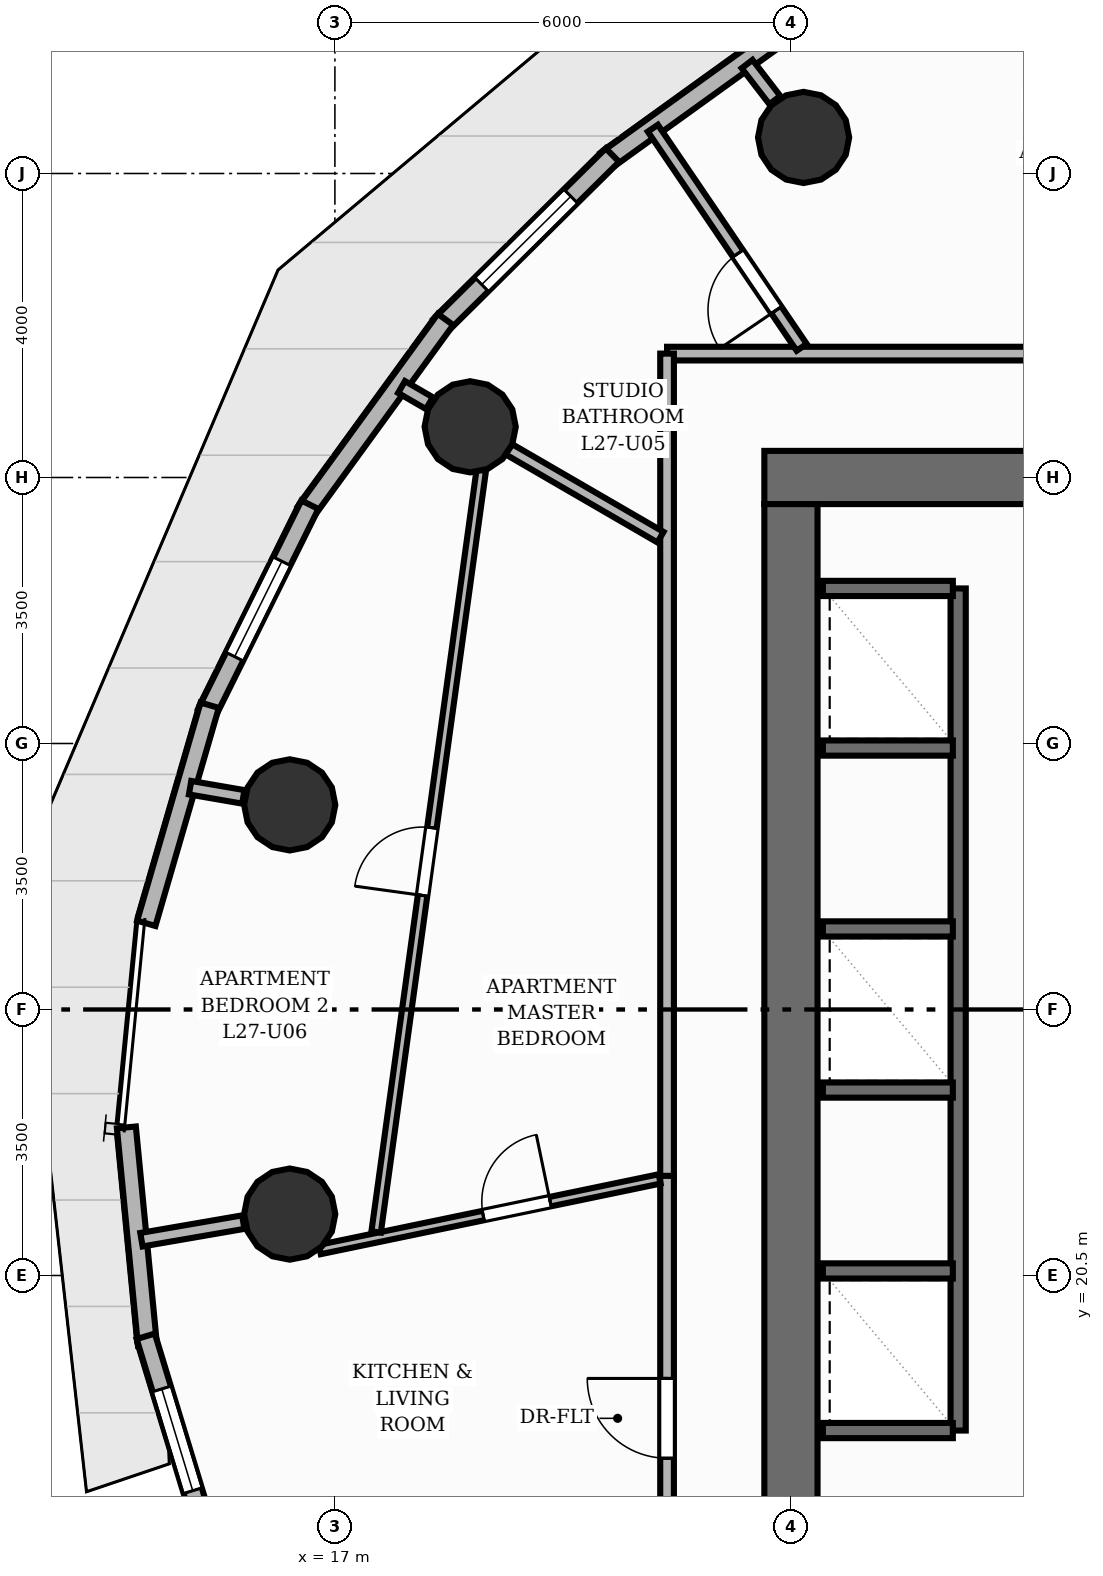
"""IFC4 building model, lengths in metres.
Left out: names, types, materials, properties, quantities, classifications, styles, units other than length and angle.
Written with IfcOpenShell. Run it as: python <this file> out.ifc"""

import sys

from ifc_helpers import new_model, si_unit, direction, frame, frame_2d, origin, origin_2d, place, context, subcontext, project, spatial, rectangle, circle, extrude, element, fill, save


model = new_model("IFC4")
c1 = context("Model", 3, precision=1e-05, world=origin(), true_north=direction((0.0, 1.0)))
c2 = subcontext(c1, "Body", "Model", "MODEL_VIEW")
j1 = project(units=[si_unit("LENGTHUNIT", "METRE"), si_unit("PLANEANGLEUNIT", "RADIAN")], contexts=[c1])
p1 = place(None, origin())
s1 = spatial("IfcSite", under=j1, at=p1, CompositionType="ELEMENT")
p2 = place(p1, origin())
s2 = spatial("IfcBuilding", under=s1, at=p2, CompositionType="ELEMENT")
p3 = place(p2, frame((0.0, 0.0, 93.28)))
s3 = spatial("IfcBuildingStorey", under=s2, at=p3, CompositionType="ELEMENT", Elevation=93.28)
p4 = place(p3, frame((22.65, 31.0, 0.0), z_axis=(0.0, 0.0, 1.0), x_axis=(1.0, 0.0, 0.0)))
e1 = element("IfcWall", 1, at=p4, inside=s3, PredefinedType="SHEAR", context=c2, shape_type="SweptSolid", body=[
    extrude(rectangle(XDim=18.7, YDim=0.7, at=frame_2d((9.35, 0.0))), origin(), (0.0, 0.0, 1.0), 3.2),
])
p5 = place(p4, frame((11.75, 0.0, 0.0)))
e2 = element("IfcOpeningElement", 2, at=p5, cuts=e1, PredefinedType="OPENING", context=c2, shape_type="SweptSolid", body=[
    extrude(rectangle(XDim=1.1, YDim=2.15, at=frame_2d((0.55, 1.075))), frame((0.0, 0.36, 0.0), z_axis=(0.0, -1.0, 0.0), x_axis=(1.0, 0.0, 0.0)), (0.0, 0.0, 1.0), 0.72),
])
p6 = place(p3, frame((23.0, 17.35, 0.0), z_axis=(0.0, 0.0, 1.0), x_axis=(0.0, 1.0, 0.0)))
e3 = element("IfcWall", 3, at=p6, inside=s3, PredefinedType="SHEAR", context=c2, shape_type="SweptSolid", body=[
    extrude(rectangle(XDim=13.3, YDim=0.7, at=frame_2d((6.65, 0.0))), origin(), (0.0, 0.0, 1.0), 3.2),
])
for number, where, z_axis, x_axis in (
    (4, (23.167, 35.474, 0.0), (0.0, 0.0, 1.0), (1.0, 0.0, 0.0)),
    (5, (18.78, 31.667, 0.0), (0.0, 0.0, 1.0), (1.0, 0.0, 0.0)),
    (6, (16.406, 26.692, 0.0), (0.0, 0.0, 1.0), (1.0, 0.0, 0.0)),
    (7, (16.406, 21.308, 0.0), (0.0, 0.0, 1.0), (1.0, 0.0, 0.0)),
):
    element("IfcColumn", number, at=place(p3, frame(where, z_axis=z_axis, x_axis=x_axis)), inside=s3, PredefinedType="COLUMN", context=c2, shape_type="SweptSolid", body=[
        extrude(circle(Radius=0.6, at=origin_2d()), origin(), (0.0, 0.0, 1.0), 3.2),
    ])
p7 = place(p3, frame((20.568, 35.171, 0.0), z_axis=(0.0, 0.0, 1.0), x_axis=(0.81131534838, 0.584608762749, 0.0)))
e8 = element("IfcWall", 8, at=p7, inside=s3, PredefinedType="SOLIDWALL", context=c2, shape_type="SweptSolid", body=[
    extrude(rectangle(XDim=3.236, YDim=0.25, at=frame_2d((1.618, 0.0))), origin(), (0.0, 0.0, 1.0), 2.96),
])
p8 = place(p3, frame((18.384, 32.996, 0.0), z_axis=(0.0, 0.0, 1.0), x_axis=(0.710540573889, 0.703656232017, 0.0)))
e9 = element("IfcWall", 9, at=p8, inside=s3, PredefinedType="SOLIDWALL", context=c2, shape_type="SweptSolid", body=[
    extrude(rectangle(XDim=3.192, YDim=0.25, at=frame_2d((1.596, 0.0))), origin(), (0.0, 0.0, 1.0), 2.96),
])
p9 = place(p8, frame((0.771, 0.0, 0.85)))
e10 = element("IfcOpeningElement", 10, at=p9, cuts=e9, PredefinedType="OPENING", context=c2, shape_type="SweptSolid", body=[
    extrude(rectangle(XDim=1.65, YDim=1.55, at=frame_2d((0.825, 0.775))), frame((0.0, 0.135, 0.0), z_axis=(0.0, -1.0, 0.0), x_axis=(1.0, 0.0, 0.0)), (0.0, 0.0, 1.0), 0.27),
])
p10 = place(p3, frame((16.614, 30.547, 0.0), z_axis=(0.0, 0.0, 1.0), x_axis=(0.588208785685, 0.808709109905, 0.0)))
e11 = element("IfcWall", 11, at=p10, inside=s3, PredefinedType="SOLIDWALL", context=c2, shape_type="SweptSolid", body=[
    extrude(rectangle(XDim=3.131, YDim=0.25, at=frame_2d((1.565, 0.0))), origin(), (0.0, 0.0, 1.0), 2.96),
])
p11 = place(p3, frame((15.312, 27.899, 0.0), z_axis=(0.0, 0.0, 1.0), x_axis=(0.443988069997, 0.896032696781, 0.0)))
e12 = element("IfcWall", 12, at=p11, inside=s3, PredefinedType="SOLIDWALL", context=c2, shape_type="SweptSolid", body=[
    extrude(rectangle(XDim=3.061, YDim=0.25, at=frame_2d((1.53, 0.0))), origin(), (0.0, 0.0, 1.0), 2.96),
])
p12 = place(p11, frame((0.83, 0.0, 0.85)))
e13 = element("IfcOpeningElement", 13, at=p12, cuts=e12, PredefinedType="OPENING", context=c2, shape_type="SweptSolid", body=[
    extrude(rectangle(XDim=1.4, YDim=1.55, at=frame_2d((0.7, 0.775))), frame((0.0, 0.135, 0.0), z_axis=(0.0, -1.0, 0.0), x_axis=(1.0, 0.0, 0.0)), (0.0, 0.0, 1.0), 0.27),
])
p13 = place(p3, frame((14.519, 25.134, 0.0), z_axis=(0.0, 0.0, 1.0), x_axis=(0.279152874041, 0.960246672952, 0.0)))
e14 = element("IfcWall", 14, at=p13, inside=s3, PredefinedType="SOLIDWALL", context=c2, shape_type="SweptSolid", body=[
    extrude(rectangle(XDim=2.989, YDim=0.25, at=frame_2d((1.494, 0.0))), origin(), (0.0, 0.0, 1.0), 2.96),
])
p14 = place(p3, frame((14.533, 19.588, 0.0), z_axis=(0.0, 0.0, 1.0), x_axis=(-0.096332339466, 0.995349225334, 0.0)))
e15 = element("IfcWall", 15, at=p14, inside=s3, PredefinedType="SOLIDWALL", context=c2, shape_type="SweptSolid", body=[
    extrude(rectangle(XDim=2.874, YDim=0.25, at=frame_2d((1.437, 0.0))), origin(), (0.0, 0.0, 1.0), 2.96),
])
p15 = place(p3, frame((15.34, 16.976, 0.0), z_axis=(0.0, 0.0, 1.0), x_axis=(-0.291144558409, 0.956679071637, 0.0)))
e16 = element("IfcWall", 16, at=p15, inside=s3, PredefinedType="SOLIDWALL", context=c2, shape_type="SweptSolid", body=[
    extrude(rectangle(XDim=2.848, YDim=0.25, at=frame_2d((1.424, 0.0))), origin(), (0.0, 0.0, 1.0), 2.96),
])
p16 = place(p15, frame((0.724, 0.0, 0.85)))
e17 = element("IfcOpeningElement", 17, at=p16, cuts=e16, PredefinedType="OPENING", context=c2, shape_type="SweptSolid", body=[
    extrude(rectangle(XDim=1.4, YDim=1.55, at=frame_2d((0.7, 0.775))), frame((0.0, 0.135, 0.0), z_axis=(0.0, -1.0, 0.0), x_axis=(1.0, 0.0, 0.0)), (0.0, 0.0, 1.0), 0.27),
])
p17 = place(p3, frame((25.2, 18.46, 0.0), z_axis=(0.0, 0.0, 1.0), x_axis=(0.0, 1.0, 0.0)))
e18 = element("IfcWall", 18, at=p17, inside=s3, PredefinedType="SHEAR", context=c2, shape_type="SweptSolid", body=[
    extrude(rectangle(XDim=11.08, YDim=0.2, at=frame_2d((5.54, 0.0))), origin(), (0.0, 0.0, 1.0), 3.2),
])
for number, where, z_axis, x_axis in (
    (19, (23.42, 18.46, 0.0), (0.0, 0.0, 1.0), (1.0, 0.0, 0.0)),
    (20, (23.42, 29.54, 0.0), (0.0, 0.0, 1.0), (1.0, 0.0, 0.0)),
    (21, (23.42, 20.56, 0.0), (0.0, 0.0, 1.0), (1.0, 0.0, 0.0)),
    (22, (23.42, 22.94, 0.0), (0.0, 0.0, 1.0), (1.0, 0.0, 0.0)),
    (23, (23.42, 25.06, 0.0), (0.0, 0.0, 1.0), (1.0, 0.0, 0.0)),
    (24, (23.42, 27.44, 0.0), (0.0, 0.0, 1.0), (1.0, 0.0, 0.0)),
):
    element("IfcWall", number, at=place(p3, frame(where, z_axis=z_axis, x_axis=x_axis)), inside=s3, PredefinedType="SHEAR", context=c2, shape_type="SweptSolid", body=[
        extrude(rectangle(XDim=1.71, YDim=0.2, at=frame_2d((0.855, 0.0))), origin(), (0.0, 0.0, 1.0), 3.2),
    ])
p18 = place(p3, frame((22.788, 35.966, 0.0), z_axis=(0.0, 0.0, 1.0), x_axis=(-0.609809319142, 0.792548165279, 0.0)))
e25 = element("IfcWall", 25, at=p18, inside=s3, PredefinedType="PARTITIONING", context=c2, shape_type="SweptSolid", body=[
    extrude(rectangle(XDim=0.599, YDim=0.18, at=frame_2d((0.299, 0.0))), origin(), (0.0, 0.0, 1.0), 2.26),
])
p19 = place(p3, frame((18.243, 31.978, 0.0), z_axis=(0.0, 0.0, 1.0), x_axis=(-0.864926134071, 0.501899175733, 0.0)))
e26 = element("IfcWall", 26, at=p19, inside=s3, PredefinedType="PARTITIONING", context=c2, shape_type="SweptSolid", body=[
    extrude(rectangle(XDim=0.424, YDim=0.18, at=frame_2d((0.212, 0.0))), origin(), (0.0, 0.0, 1.0), 2.26),
])
p20 = place(p3, frame((15.794, 26.798, 0.0), z_axis=(0.0, 0.0, 1.0), x_axis=(-0.985420399327, 0.17013711115, 0.0)))
e27 = element("IfcWall", 27, at=p20, inside=s3, PredefinedType="PARTITIONING", context=c2, shape_type="SweptSolid", body=[
    extrude(rectangle(XDim=0.71, YDim=0.18, at=frame_2d((0.355, 0.0))), origin(), (0.0, 0.0, 1.0), 2.26),
])
p21 = place(p3, frame((15.794, 21.202, 0.0), z_axis=(0.0, 0.0, 1.0), x_axis=(-0.98540615772, -0.170219576807, 0.0)))
e28 = element("IfcWall", 28, at=p21, inside=s3, PredefinedType="PARTITIONING", context=c2, shape_type="SweptSolid", body=[
    extrude(rectangle(XDim=1.36, YDim=0.18, at=frame_2d((0.68, 0.0))), origin(), (0.0, 0.0, 1.0), 2.26),
])
p22 = place(p3, frame((21.37, 32.63, 0.0), z_axis=(0.0, 0.0, 1.0), x_axis=(1.0, 0.0, 0.0)))
e29 = element("IfcWall", 29, at=p22, inside=s3, PredefinedType="PARTITIONING", context=c2, shape_type="SweptSolid", body=[
    extrude(rectangle(XDim=12.686, YDim=0.18, at=frame_2d((6.343, 0.0))), origin(), (0.0, 0.0, 1.0), 2.955),
])
p23 = place(p22, frame((10.499, 0.0, 0.0)))
e30 = element("IfcOpeningElement", 30, at=p23, cuts=e29, PredefinedType="OPENING", context=c2, shape_type="SweptSolid", body=[
    extrude(rectangle(XDim=1.05, YDim=2.15, at=frame_2d((0.525, 1.075))), frame((0.0, 0.1, 0.0), z_axis=(0.0, -1.0, 0.0), x_axis=(1.0, 0.0, 0.0)), (0.0, 0.0, 1.0), 0.2),
])
p24 = place(p22, frame((4.713, 0.0, 0.0)))
e31 = element("IfcOpeningElement", 31, at=p24, cuts=e29, PredefinedType="OPENING", context=c2, shape_type="SweptSolid", body=[
    extrude(rectangle(XDim=1.05, YDim=2.15, at=frame_2d((0.525, 1.075))), frame((0.0, 0.1, 0.0), z_axis=(0.0, -1.0, 0.0), x_axis=(1.0, 0.0, 0.0)), (0.0, 0.0, 1.0), 0.2),
])
p25 = place(p3, frame((21.37, 21.771, 0.0), z_axis=(0.0, 0.0, 1.0), x_axis=(0.0, 1.0, 0.0)))
e32 = element("IfcWall", 32, at=p25, inside=s3, PredefinedType="PARTITIONING", context=c2, shape_type="SweptSolid", body=[
    extrude(rectangle(XDim=10.859, YDim=0.18, at=frame_2d((5.43, 0.0))), origin(), (0.0, 0.0, 1.0), 2.955),
])
p26 = place(p3, frame((21.37, 15.43, 0.0), z_axis=(0.0, 0.0, 1.0), x_axis=(0.0, 1.0, 0.0)))
e33 = element("IfcWall", 33, at=p26, inside=s3, PredefinedType="PARTITIONING", context=c2, shape_type="SweptSolid", body=[
    extrude(rectangle(XDim=6.381, YDim=0.18, at=frame_2d((3.19, 0.0))), origin(), (0.0, 0.0, 1.0), 2.955),
])
p27 = place(p26, frame((2.666, 0.0, 0.0)))
e34 = element("IfcOpeningElement", 34, at=p27, cuts=e33, PredefinedType="OPENING", context=c2, shape_type="SweptSolid", body=[
    extrude(rectangle(XDim=1.05, YDim=2.15, at=frame_2d((0.525, 1.075))), frame((0.0, 0.1, 0.0), z_axis=(0.0, -1.0, 0.0), x_axis=(1.0, 0.0, 0.0)), (0.0, 0.0, 1.0), 0.2),
])
p28 = place(p3, frame((23.142, 32.713, 0.0), z_axis=(0.0, 0.0, 1.0), x_axis=(-0.561921019334, 0.827190889717, 0.0)))
e35 = element("IfcWall", 35, at=p28, inside=s3, PredefinedType="PLUMBINGWALL", context=c2, shape_type="SweptSolid", body=[
    extrude(rectangle(XDim=3.485, YDim=0.16, at=frame_2d((1.743, 0.0))), origin(), (0.0, 0.0, 1.0), 2.641),
])
p29 = place(p28, frame((0.593, 0.0, 0.0)))
e36 = element("IfcOpeningElement", 36, at=p29, cuts=e35, PredefinedType="OPENING", context=c2, shape_type="SweptSolid", body=[
    extrude(rectangle(XDim=0.9, YDim=2.1, at=frame_2d((0.45, 1.05))), frame((0.0, 0.09, 0.0), z_axis=(0.0, -1.0, 0.0), x_axis=(1.0, 0.0, 0.0)), (0.0, 0.0, 1.0), 0.18),
])
p30 = place(p3, frame((21.283, 30.215, 0.0), z_axis=(0.0, 0.0, 1.0), x_axis=(-0.865054150745, 0.501678498921, 0.0)))
e37 = element("IfcWall", 37, at=p30, inside=s3, PredefinedType="PLUMBINGWALL", context=c2, shape_type="SweptSolid", body=[
    extrude(rectangle(XDim=2.307, YDim=0.16, at=frame_2d((1.154, 0.0))), origin(), (0.0, 0.0, 1.0), 2.26),
])
p31 = place(p3, frame((16.801, 20.842, 0.0), z_axis=(0.0, 0.0, 1.0), x_axis=(0.979089254375, 0.203431147977, 0.0)))
e38 = element("IfcWall", 38, at=p31, inside=s3, PredefinedType="PARTITIONING", context=c2, shape_type="SweptSolid", body=[
    extrude(rectangle(XDim=4.566, YDim=0.125, at=frame_2d((2.283, 0.0))), origin(), (0.0, 0.0, 1.0), 2.955),
])
p32 = place(p31, frame((2.196, 0.0, 0.0)))
e39 = element("IfcOpeningElement", 39, at=p32, cuts=e38, PredefinedType="OPENING", context=c2, shape_type="SweptSolid", body=[
    extrude(rectangle(XDim=0.9, YDim=2.1, at=frame_2d((0.45, 1.05))), frame((0.0, 0.073, 0.0), z_axis=(0.0, -1.0, 0.0), x_axis=(1.0, 0.0, 0.0)), (0.0, 0.0, 1.0), 0.145),
])
p33 = place(p3, frame((17.542, 21.073, 0.0), z_axis=(0.0, 0.0, 1.0), x_axis=(0.136714950607, 0.99061042912, 0.0)))
e40 = element("IfcWall", 40, at=p33, inside=s3, PredefinedType="PARTITIONING", context=c2, shape_type="SweptSolid", body=[
    extrude(rectangle(XDim=10.12, YDim=0.125, at=frame_2d((5.06, 0.0))), origin(), (0.0, 0.0, 1.0), 2.955),
])
p34 = place(p33, frame((4.47, 0.0, 0.0)))
e41 = element("IfcOpeningElement", 41, at=p34, cuts=e40, PredefinedType="OPENING", context=c2, shape_type="SweptSolid", body=[
    extrude(rectangle(XDim=0.9, YDim=2.1, at=frame_2d((0.45, 1.05))), frame((0.0, 0.073, 0.0), z_axis=(0.0, -1.0, 0.0), x_axis=(1.0, 0.0, 0.0)), (0.0, 0.0, 1.0), 0.145),
])
p35 = place(p9, origin())
e42 = element("IfcWindow", 42, at=p35, inside=s3, PartitioningType="SINGLE_PANEL", PredefinedType="WINDOW", context=c2, shape_type="SweptSolid", body=[
    extrude(rectangle(XDim=1.65, YDim=1.55, at=frame_2d((0.825, 0.775))), frame((0.0, 0.03, 0.0), z_axis=(0.0, -1.0, 0.0), x_axis=(1.0, 0.0, 0.0)), (0.0, 0.0, 1.0), 0.06),
])
fill(e10, e42)
p36 = place(p12, origin())
e43 = element("IfcWindow", 43, at=p36, inside=s3, PartitioningType="SINGLE_PANEL", PredefinedType="WINDOW", context=c2, shape_type="SweptSolid", body=[
    extrude(rectangle(XDim=1.4, YDim=1.55, at=frame_2d((0.7, 0.775))), frame((0.0, 0.03, 0.0), z_axis=(0.0, -1.0, 0.0), x_axis=(1.0, 0.0, 0.0)), (0.0, 0.0, 1.0), 0.06),
])
fill(e13, e43)
p37 = place(p16, origin())
e44 = element("IfcWindow", 44, at=p37, inside=s3, PartitioningType="SINGLE_PANEL", PredefinedType="WINDOW", context=c2, shape_type="SweptSolid", body=[
    extrude(rectangle(XDim=1.4, YDim=1.55, at=frame_2d((0.7, 0.775))), frame((0.0, 0.03, 0.0), z_axis=(0.0, -1.0, 0.0), x_axis=(1.0, 0.0, 0.0)), (0.0, 0.0, 1.0), 0.06),
])
fill(e17, e44)
p38 = place(p29, origin())
e45 = element("IfcDoor", 45, at=p38, inside=s3, OperationType="SINGLE_SWING_LEFT", PredefinedType="DOOR", context=c2, shape_type="SweptSolid", body=[
    extrude(rectangle(XDim=0.9, YDim=2.1, at=frame_2d((0.45, 1.05))), frame((0.0, 0.025, 0.0), z_axis=(0.0, -1.0, 0.0), x_axis=(1.0, 0.0, 0.0)), (0.0, 0.0, 1.0), 0.05),
])
fill(e36, e45)
p39 = place(p27, origin())
e46 = element("IfcDoor", 46, at=p39, inside=s3, OperationType="SINGLE_SWING_RIGHT", PredefinedType="DOOR", context=c2, shape_type="SweptSolid", body=[
    extrude(rectangle(XDim=1.05, YDim=2.15, at=frame_2d((0.525, 1.075))), frame((0.0, 0.025, 0.0), z_axis=(0.0, -1.0, 0.0), x_axis=(1.0, 0.0, 0.0)), (0.0, 0.0, 1.0), 0.05),
])
fill(e34, e46)
p40 = place(p32, origin())
e47 = element("IfcDoor", 47, at=p40, inside=s3, OperationType="SINGLE_SWING_RIGHT", PredefinedType="DOOR", context=c2, shape_type="SweptSolid", body=[
    extrude(rectangle(XDim=0.9, YDim=2.1, at=frame_2d((0.45, 1.05))), frame((0.0, 0.025, 0.0), z_axis=(0.0, -1.0, 0.0), x_axis=(1.0, 0.0, 0.0)), (0.0, 0.0, 1.0), 0.05),
])
fill(e39, e47)
p41 = place(p34, origin())
e48 = element("IfcDoor", 48, at=p41, inside=s3, OperationType="SINGLE_SWING_LEFT", PredefinedType="DOOR", context=c2, shape_type="SweptSolid", body=[
    extrude(rectangle(XDim=0.9, YDim=2.1, at=frame_2d((0.45, 1.05))), frame((0.0, 0.025, 0.0), z_axis=(0.0, -1.0, 0.0), x_axis=(1.0, 0.0, 0.0)), (0.0, 0.0, 1.0), 0.05),
])
fill(e41, e48)
save(model, sys.argv[1])
